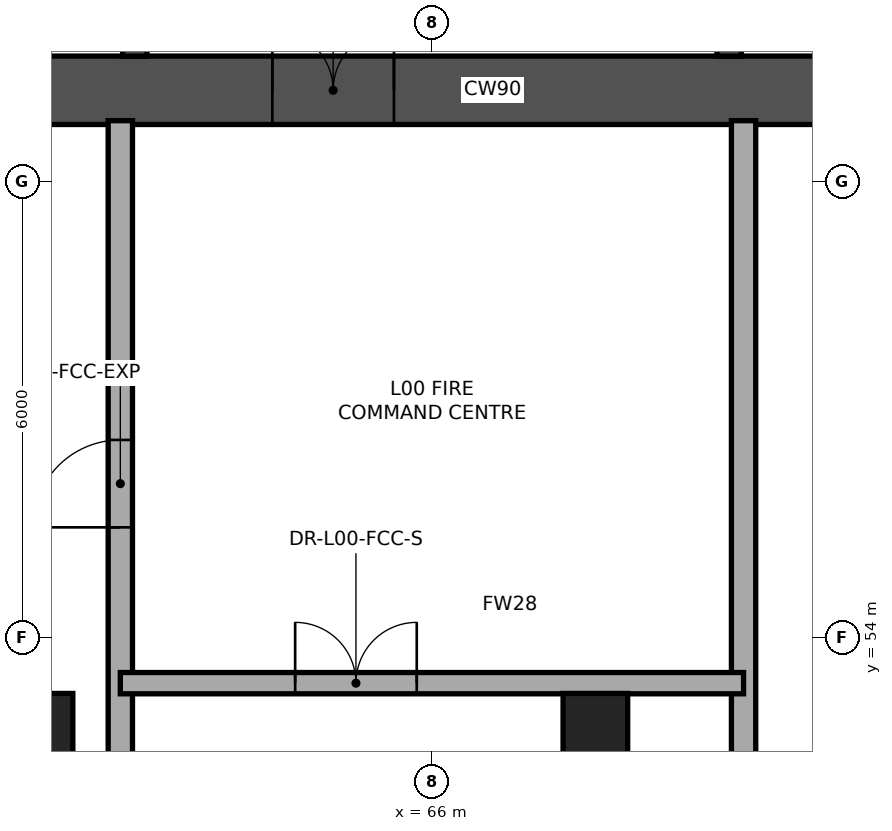
"""IFC4 building model, lengths in metres.
Left out: names, types, materials, properties, quantities, classifications, styles, units other than length and angle.
Written with IfcOpenShell. Run it as: python <this file> out.ifc"""

import sys

from ifc_helpers import new_model, si_unit, direction, frame, frame_2d, origin, origin_2d, place, context, subcontext, project, spatial, rectangle, extrude, element, fill, save


model = new_model("IFC4")
c1 = context("Model", 3, precision=1e-05, world=origin(), true_north=direction((0.0, 1.0)))
c2 = subcontext(c1, "Body", "Model", "MODEL_VIEW")
j1 = project(units=[si_unit("LENGTHUNIT", "METRE"), si_unit("PLANEANGLEUNIT", "RADIAN")], contexts=[c1])
p1 = place(None, origin())
s1 = spatial("IfcSite", under=j1, at=p1, CompositionType="ELEMENT")
p2 = place(p1, origin())
s2 = spatial("IfcBuilding", under=s1, at=p2, CompositionType="ELEMENT")
p3 = place(p2, origin())
s3 = spatial("IfcBuildingStorey", under=s2, at=p3, CompositionType="ELEMENT", Elevation=0.0)
p4 = place(p3, frame((57.8, 61.2, 0.0), z_axis=(0.0, 0.0, 1.0), x_axis=(1.0, 0.0, 0.0)))
e1 = element("IfcWall", 1, at=p4, inside=s3, PredefinedType="SHEAR", context=c2, shape_type="SweptSolid", body=[
    extrude(rectangle(XDim=16.4, YDim=0.9, at=frame_2d((8.2, 0.0))), origin(), (0.0, 0.0, 1.0), 5.4),
])
p5 = place(p4, frame((1.35, 0.0, 0.0)))
e2 = element("IfcOpeningElement", 2, at=p5, cuts=e1, PredefinedType="OPENING", context=c2, shape_type="SweptSolid", body=[
    extrude(rectangle(XDim=1.15, YDim=2.15, at=frame_2d((0.575, 1.075))), frame((0.0, 0.46, 0.0), z_axis=(0.0, -1.0, 0.0), x_axis=(1.0, 0.0, 0.0)), (0.0, 0.0, 1.0), 0.92),
])
p6 = place(p4, frame((6.1, 0.0, 0.0)))
e3 = element("IfcOpeningElement", 3, at=p6, cuts=e1, PredefinedType="OPENING", context=c2, shape_type="SweptSolid", body=[
    extrude(rectangle(XDim=1.6, YDim=2.15, at=frame_2d((0.8, 1.075))), frame((0.0, 0.46, 0.0), z_axis=(0.0, -1.0, 0.0), x_axis=(1.0, 0.0, 0.0)), (0.0, 0.0, 1.0), 0.92),
])
p7 = place(p4, frame((13.55, 0.0, 0.0)))
e4 = element("IfcOpeningElement", 4, at=p7, cuts=e1, PredefinedType="OPENING", context=c2, shape_type="SweptSolid", body=[
    extrude(rectangle(XDim=1.15, YDim=2.15, at=frame_2d((0.575, 1.075))), frame((0.0, 0.46, 0.0), z_axis=(0.0, -1.0, 0.0), x_axis=(1.0, 0.0, 0.0)), (0.0, 0.0, 1.0), 0.92),
])
p8 = place(p3, frame((62.09, 61.65, 0.0), z_axis=(0.0, 0.0, 1.0), x_axis=(0.0, 1.0, 0.0)))
e5 = element("IfcWall", 5, at=p8, inside=s3, PredefinedType="SHEAR", context=c2, shape_type="SweptSolid", body=[
    extrude(rectangle(XDim=12.7, YDim=0.32, at=frame_2d((6.35, 0.0))), origin(), (0.0, 0.0, 1.0), 5.4),
])
p9 = place(p8, frame((0.55, 0.0, 0.0)))
e6 = element("IfcOpeningElement", 6, at=p9, cuts=e5, PredefinedType="OPENING", context=c2, shape_type="SweptSolid", body=[
    extrude(rectangle(XDim=1.15, YDim=2.15, at=frame_2d((0.575, 1.075))), frame((0.0, 0.17, 0.0), z_axis=(0.0, -1.0, 0.0), x_axis=(1.0, 0.0, 0.0)), (0.0, 0.0, 1.0), 0.34),
])
p10 = place(p3, frame((69.91, 61.65, 0.0), z_axis=(0.0, 0.0, 1.0), x_axis=(0.0, 1.0, 0.0)))
e7 = element("IfcWall", 7, at=p10, inside=s3, PredefinedType="SHEAR", context=c2, shape_type="SweptSolid", body=[
    extrude(rectangle(XDim=12.7, YDim=0.32, at=frame_2d((6.35, 0.0))), origin(), (0.0, 0.0, 1.0), 5.4),
])
p11 = place(p10, frame((8.75, 0.0, 0.0)))
e8 = element("IfcOpeningElement", 8, at=p11, cuts=e7, PredefinedType="OPENING", context=c2, shape_type="SweptSolid", body=[
    extrude(rectangle(XDim=0.92, YDim=2.05, at=frame_2d((0.46, 1.025))), frame((0.0, 0.17, 0.0), z_axis=(0.0, -1.0, 0.0), x_axis=(1.0, 0.0, 0.0)), (0.0, 0.0, 1.0), 0.34),
])
for number, where, z_axis, x_axis in (
    (9, (60.85, 52.84, 0.0), (0.0, 0.0, 1.0), (1.0, 0.0, 0.0)),
    (10, (68.15, 52.84, 0.0), (0.0, 0.0, 1.0), (1.0, 0.0, 0.0)),
):
    element("IfcColumn", number, at=place(p3, frame(where, z_axis=z_axis, x_axis=x_axis)), inside=s3, PredefinedType="COLUMN", context=c2, shape_type="SweptSolid", body=[
        extrude(rectangle(XDim=0.85, YDim=0.85, at=origin_2d()), origin(), (0.0, 0.0, 1.0), 5.4),
    ])
p12 = place(p3, frame((61.9, 44.05, 0.0), z_axis=(0.0, 0.0, 1.0), x_axis=(0.0, 1.0, 0.0)))
e11 = element("IfcWall", 11, at=p12, inside=s3, PredefinedType="STANDARD", context=c2, shape_type="SweptSolid", body=[
    extrude(rectangle(XDim=16.75, YDim=0.32, at=frame_2d((8.375, 0.0))), origin(), (0.0, 0.0, 1.0), 4.08),
])
p13 = place(p12, frame((11.4, 0.0, 0.0)))
e12 = element("IfcOpeningElement", 12, at=p13, cuts=e11, PredefinedType="OPENING", context=c2, shape_type="SweptSolid", body=[
    extrude(rectangle(XDim=1.15, YDim=2.15, at=frame_2d((0.575, 1.075))), frame((0.0, 0.17, 0.0), z_axis=(0.0, -1.0, 0.0), x_axis=(1.0, 0.0, 0.0)), (0.0, 0.0, 1.0), 0.34),
])
p14 = place(p3, frame((70.1, 44.05, 0.0), z_axis=(0.0, 0.0, 1.0), x_axis=(0.0, 1.0, 0.0)))
e13 = element("IfcWall", 13, at=p14, inside=s3, PredefinedType="STANDARD", context=c2, shape_type="SweptSolid", body=[
    extrude(rectangle(XDim=16.75, YDim=0.32, at=frame_2d((8.375, 0.0))), origin(), (0.0, 0.0, 1.0), 4.08),
])
p15 = place(p14, frame((3.5, 0.0, 0.0)))
e14 = element("IfcOpeningElement", 14, at=p15, cuts=e13, PredefinedType="OPENING", context=c2, shape_type="SweptSolid", body=[
    extrude(rectangle(XDim=1.15, YDim=2.15, at=frame_2d((0.575, 1.075))), frame((0.0, 0.17, 0.0), z_axis=(0.0, -1.0, 0.0), x_axis=(1.0, 0.0, 0.0)), (0.0, 0.0, 1.0), 0.34),
])
p16 = place(p3, frame((61.9, 53.4, 0.0), z_axis=(0.0, 0.0, 1.0), x_axis=(1.0, 0.0, 0.0)))
e15 = element("IfcWall", 15, at=p16, inside=s3, PredefinedType="STANDARD", context=c2, shape_type="SweptSolid", body=[
    extrude(rectangle(XDim=8.2, YDim=0.28, at=frame_2d((4.1, 0.0))), origin(), (0.0, 0.0, 1.0), 4.08),
])
p17 = place(p16, frame((2.3, 0.0, 0.0)))
e16 = element("IfcOpeningElement", 16, at=p17, cuts=e15, PredefinedType="OPENING", context=c2, shape_type="SweptSolid", body=[
    extrude(rectangle(XDim=1.6, YDim=2.15, at=frame_2d((0.8, 1.075))), frame((0.0, 0.15, 0.0), z_axis=(0.0, -1.0, 0.0), x_axis=(1.0, 0.0, 0.0)), (0.0, 0.0, 1.0), 0.3),
])
p18 = place(p6, origin())
e17 = element("IfcDoor", 17, at=p18, inside=s3, OperationType="DOUBLE_DOOR_SINGLE_SWING", PredefinedType="DOOR", context=c2, shape_type="SweptSolid", body=[
    extrude(rectangle(XDim=1.6, YDim=2.15, at=frame_2d((0.8, 1.075))), frame((0.0, 0.025, 0.0), z_axis=(0.0, -1.0, 0.0), x_axis=(1.0, 0.0, 0.0)), (0.0, 0.0, 1.0), 0.05),
])
fill(e3, e17)
p19 = place(p13, origin())
e18 = element("IfcDoor", 18, at=p19, inside=s3, OperationType="SINGLE_SWING_LEFT", PredefinedType="DOOR", context=c2, shape_type="SweptSolid", body=[
    extrude(rectangle(XDim=1.15, YDim=2.15, at=frame_2d((0.575, 1.075))), frame((0.0, 0.025, 0.0), z_axis=(0.0, -1.0, 0.0), x_axis=(1.0, 0.0, 0.0)), (0.0, 0.0, 1.0), 0.05),
])
fill(e12, e18)
p20 = place(p17, origin())
e19 = element("IfcDoor", 19, at=p20, inside=s3, OperationType="DOUBLE_DOOR_SINGLE_SWING", PredefinedType="DOOR", context=c2, shape_type="SweptSolid", body=[
    extrude(rectangle(XDim=1.6, YDim=2.15, at=frame_2d((0.8, 1.075))), frame((0.0, 0.025, 0.0), z_axis=(0.0, -1.0, 0.0), x_axis=(1.0, 0.0, 0.0)), (0.0, 0.0, 1.0), 0.05),
])
fill(e16, e19)
save(model, sys.argv[1])
